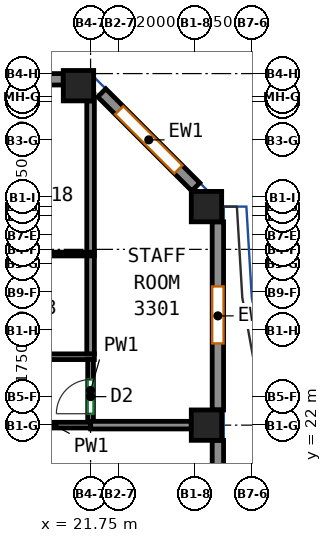
"""IFC4 building model, lengths in metres.
Left out: names, types, materials, properties, quantities, classifications, styles, units other than length and angle.
Written with IfcOpenShell. Run it as: python <this file> out.ifc"""

import sys

from ifc_helpers import new_model, si_unit, direction, frame, frame_2d, origin, origin_2d, place, context, subcontext, project, spatial, rectangle, extrude, source, transform, mapped, element, fill, save


model = new_model("IFC4")
c1 = context("Model", 3, precision=1e-05, world=origin(), true_north=direction((0.0, 1.0)))
c2 = subcontext(c1, "Body", "Model", "MODEL_VIEW")
j1 = project(units=[si_unit("LENGTHUNIT", "METRE"), si_unit("PLANEANGLEUNIT", "RADIAN")], contexts=[c1])
p1 = place(None, origin())
s1 = spatial("IfcSite", under=j1, at=p1, CompositionType="ELEMENT")
p2 = place(p1, origin())
s2 = spatial("IfcBuilding", under=s1, at=p2, CompositionType="ELEMENT")
p3 = place(p2, frame((0.0, 0.0, 147.3)))
s3 = spatial("IfcBuildingStorey", under=s2, at=p3, CompositionType="ELEMENT", Elevation=147.3)
m1 = source(origin(), c2, "Body", "SweptSolid", [
    extrude(rectangle(XDim=0.8, YDim=0.8, at=origin_2d()), origin(), (0.0, 0.0, 1.0), 3.12),
])
for number, where, z_axis, x_axis in (
    (1, (21.432, 30.932, 0.0), (0.0, 0.0, 1.0), (1.0, 0.0, 0.0)),
    (2, (24.8, 22.0, 0.0), (0.0, 0.0, 1.0), (1.0, 0.0, 0.0)),
    (3, (24.8, 27.75, 0.0), (0.0, 0.0, 1.0), (1.0, 0.0, 0.0)),
):
    element("IfcColumn", number, at=place(p3, frame(where, z_axis=z_axis, x_axis=x_axis)), inside=s3, PredefinedType="COLUMN", context=c2, shape_type="MappedRepresentation", body=[
        mapped(m1, transform((0.0, 0.0, 0.0))),
    ])
m2 = source(origin(), c2, "Body", "SweptSolid", [
    extrude(rectangle(XDim=13.2, YDim=0.3, at=frame_2d((6.6, 0.0))), origin(), (0.0, 0.0, 1.0), 3.12),
])
p4 = place(p3, frame((25.1, 8.4, 0.0), z_axis=(0.0, 0.0, 1.0), x_axis=(0.0, 1.0, 0.0)))
e4 = element("IfcWall", 4, at=p4, inside=s3, PredefinedType="SOLIDWALL", context=c2, shape_type="MappedRepresentation", body=[
    mapped(m2, transform((0.0, 0.0, 0.0))),
])
p5 = place(p4, frame((0.9, 0.0, 0.85)))
e5 = element("IfcOpeningElement", 5, at=p5, cuts=e4, PredefinedType="OPENING", context=c2, shape_type="SweptSolid", body=[
    extrude(rectangle(XDim=1.5, YDim=1.95, at=frame_2d((0.75, 0.975))), frame((0.0, 0.16, 0.0), z_axis=(0.0, -1.0, 0.0), x_axis=(1.0, 0.0, 0.0)), (0.0, 0.0, 1.0), 0.32),
])
p6 = place(p4, frame((4.2, 0.0, 0.85)))
e6 = element("IfcOpeningElement", 6, at=p6, cuts=e4, PredefinedType="OPENING", context=c2, shape_type="SweptSolid", body=[
    extrude(rectangle(XDim=1.5, YDim=1.95, at=frame_2d((0.75, 0.975))), frame((0.0, 0.16, 0.0), z_axis=(0.0, -1.0, 0.0), x_axis=(1.0, 0.0, 0.0)), (0.0, 0.0, 1.0), 0.32),
])
p7 = place(p4, frame((7.5, 0.0, 0.85)))
e7 = element("IfcOpeningElement", 7, at=p7, cuts=e4, PredefinedType="OPENING", context=c2, shape_type="SweptSolid", body=[
    extrude(rectangle(XDim=1.5, YDim=1.95, at=frame_2d((0.75, 0.975))), frame((0.0, 0.16, 0.0), z_axis=(0.0, -1.0, 0.0), x_axis=(1.0, 0.0, 0.0)), (0.0, 0.0, 1.0), 0.32),
])
p8 = place(p4, frame((10.8, 0.0, 0.85)))
e8 = element("IfcOpeningElement", 8, at=p8, cuts=e4, PredefinedType="OPENING", context=c2, shape_type="SweptSolid", body=[
    extrude(rectangle(XDim=1.5, YDim=1.95, at=frame_2d((0.75, 0.975))), frame((0.0, 0.16, 0.0), z_axis=(0.0, -1.0, 0.0), x_axis=(1.0, 0.0, 0.0)), (0.0, 0.0, 1.0), 0.32),
])
m3 = source(origin(), c2, "Body", "SweptSolid", [
    extrude(rectangle(XDim=4.95, YDim=0.3, at=frame_2d((2.475, 0.0))), origin(), (0.0, 0.0, 1.0), 3.12),
])
p9 = place(p3, frame((25.1, 22.4, 0.0), z_axis=(0.0, 0.0, 1.0), x_axis=(0.0, 1.0, 0.0)))
e9 = element("IfcWall", 9, at=p9, inside=s3, PredefinedType="SOLIDWALL", context=c2, shape_type="MappedRepresentation", body=[
    mapped(m3, transform((0.0, 0.0, 0.0))),
])
p10 = place(p9, frame((1.75, 0.0, 0.85)))
e10 = element("IfcOpeningElement", 10, at=p10, cuts=e9, PredefinedType="OPENING", context=c2, shape_type="SweptSolid", body=[
    extrude(rectangle(XDim=1.5, YDim=1.95, at=frame_2d((0.75, 0.975))), frame((0.0, 0.16, 0.0), z_axis=(0.0, -1.0, 0.0), x_axis=(1.0, 0.0, 0.0)), (0.0, 0.0, 1.0), 0.32),
])
m4 = source(origin(), c2, "Body", "SweptSolid", [
    extrude(rectangle(XDim=3.5, YDim=0.3, at=frame_2d((1.75, 0.0))), origin(), (0.0, 0.0, 1.0), 3.12),
])
p11 = place(p3, frame((24.519, 28.269, 0.0), z_axis=(0.0, 0.0, 1.0), x_axis=(-0.70707190453, 0.707141656123, 0.0)))
e11 = element("IfcWall", 11, at=p11, inside=s3, PredefinedType="SOLIDWALL", context=c2, shape_type="MappedRepresentation", body=[
    mapped(m4, transform((0.0, 0.0, 0.0))),
])
p12 = place(p11, frame((0.65, 0.0, 0.85)))
e12 = element("IfcOpeningElement", 12, at=p12, cuts=e11, PredefinedType="OPENING", context=c2, shape_type="SweptSolid", body=[
    extrude(rectangle(XDim=2.2, YDim=1.95, at=frame_2d((1.1, 0.975))), frame((0.0, 0.16, 0.0), z_axis=(0.0, -1.0, 0.0), x_axis=(1.0, 0.0, 0.0)), (0.0, 0.0, 1.0), 0.32),
])
m5 = source(origin(), c2, "Body", "SweptSolid", [
    extrude(rectangle(XDim=6.465, YDim=0.3, at=frame_2d((3.232, 0.0))), origin(), (0.0, 0.0, 1.0), 3.12),
])
p13 = place(p3, frame((21.032, 31.1, 0.0), z_axis=(0.0, 0.0, 1.0), x_axis=(-1.0, 0.0, 0.0)))
e13 = element("IfcWall", 13, at=p13, inside=s3, PredefinedType="SOLIDWALL", context=c2, shape_type="MappedRepresentation", body=[
    mapped(m5, transform((0.0, 0.0, 0.0))),
])
p14 = place(p13, frame((0.516, 0.0, 0.85)))
e14 = element("IfcOpeningElement", 14, at=p14, cuts=e13, PredefinedType="OPENING", context=c2, shape_type="SweptSolid", body=[
    extrude(rectangle(XDim=2.2, YDim=1.95, at=frame_2d((1.1, 0.975))), frame((0.0, 0.16, 0.0), z_axis=(0.0, -1.0, 0.0), x_axis=(1.0, 0.0, 0.0)), (0.0, 0.0, 1.0), 0.32),
])
p15 = place(p13, frame((3.749, 0.0, 0.85)))
e15 = element("IfcOpeningElement", 15, at=p15, cuts=e13, PredefinedType="OPENING", context=c2, shape_type="SweptSolid", body=[
    extrude(rectangle(XDim=2.2, YDim=1.95, at=frame_2d((1.1, 0.975))), frame((0.0, 0.16, 0.0), z_axis=(0.0, -1.0, 0.0), x_axis=(1.0, 0.0, 0.0)), (0.0, 0.0, 1.0), 0.32),
])
p16 = place(p3, frame((-20.059, 23.8, 0.0), z_axis=(0.0, 0.0, 1.0), x_axis=(1.0, 0.0, 0.0)))
e16 = element("IfcWall", 16, at=p16, inside=s3, PredefinedType="PARTITIONING", context=c2, shape_type="SweptSolid", body=[
    extrude(rectangle(XDim=41.909, YDim=0.15, at=frame_2d((20.955, 0.0))), origin(), (0.0, 0.0, 1.0), 3.12),
])
p17 = place(p16, frame((0.401, 0.0, 0.0)))
e17 = element("IfcOpeningElement", 17, at=p17, cuts=e16, PredefinedType="OPENING", context=c2, shape_type="SweptSolid", body=[
    extrude(rectangle(XDim=1.0, YDim=2.1, at=frame_2d((0.5, 1.05))), frame((0.0, 0.085, 0.0), z_axis=(0.0, -1.0, 0.0), x_axis=(1.0, 0.0, 0.0)), (0.0, 0.0, 1.0), 0.17),
])
p18 = place(p16, frame((6.082, 0.0, 0.0)))
e18 = element("IfcOpeningElement", 18, at=p18, cuts=e16, PredefinedType="OPENING", context=c2, shape_type="SweptSolid", body=[
    extrude(rectangle(XDim=1.0, YDim=2.1, at=frame_2d((0.5, 1.05))), frame((0.0, 0.085, 0.0), z_axis=(0.0, -1.0, 0.0), x_axis=(1.0, 0.0, 0.0)), (0.0, 0.0, 1.0), 0.17),
])
p19 = place(p16, frame((8.08, 0.0, 0.0)))
e19 = element("IfcOpeningElement", 19, at=p19, cuts=e16, PredefinedType="OPENING", context=c2, shape_type="SweptSolid", body=[
    extrude(rectangle(XDim=1.0, YDim=2.1, at=frame_2d((0.5, 1.05))), frame((0.0, 0.085, 0.0), z_axis=(0.0, -1.0, 0.0), x_axis=(1.0, 0.0, 0.0)), (0.0, 0.0, 1.0), 0.17),
])
p20 = place(p16, frame((13.769, 0.0, 0.0)))
e20 = element("IfcOpeningElement", 20, at=p20, cuts=e16, PredefinedType="OPENING", context=c2, shape_type="SweptSolid", body=[
    extrude(rectangle(XDim=1.0, YDim=2.1, at=frame_2d((0.5, 1.05))), frame((0.0, 0.085, 0.0), z_axis=(0.0, -1.0, 0.0), x_axis=(1.0, 0.0, 0.0)), (0.0, 0.0, 1.0), 0.17),
])
p21 = place(p16, frame((15.56, 0.0, 0.0)))
e21 = element("IfcOpeningElement", 21, at=p21, cuts=e16, PredefinedType="OPENING", context=c2, shape_type="SweptSolid", body=[
    extrude(rectangle(XDim=1.0, YDim=2.1, at=frame_2d((0.5, 1.05))), frame((0.0, 0.085, 0.0), z_axis=(0.0, -1.0, 0.0), x_axis=(1.0, 0.0, 0.0)), (0.0, 0.0, 1.0), 0.17),
])
p22 = place(p16, frame((21.625, 0.0, 0.0)))
e22 = element("IfcOpeningElement", 22, at=p22, cuts=e16, PredefinedType="OPENING", context=c2, shape_type="SweptSolid", body=[
    extrude(rectangle(XDim=1.0, YDim=2.1, at=frame_2d((0.5, 1.05))), frame((0.0, 0.085, 0.0), z_axis=(0.0, -1.0, 0.0), x_axis=(1.0, 0.0, 0.0)), (0.0, 0.0, 1.0), 0.17),
])
p23 = place(p16, frame((23.212, 0.0, 0.0)))
e23 = element("IfcOpeningElement", 23, at=p23, cuts=e16, PredefinedType="OPENING", context=c2, shape_type="SweptSolid", body=[
    extrude(rectangle(XDim=1.0, YDim=2.1, at=frame_2d((0.5, 1.05))), frame((0.0, 0.085, 0.0), z_axis=(0.0, -1.0, 0.0), x_axis=(1.0, 0.0, 0.0)), (0.0, 0.0, 1.0), 0.17),
])
p24 = place(p16, frame((29.038, 0.0, 0.0)))
e24 = element("IfcOpeningElement", 24, at=p24, cuts=e16, PredefinedType="OPENING", context=c2, shape_type="SweptSolid", body=[
    extrude(rectangle(XDim=1.0, YDim=2.1, at=frame_2d((0.5, 1.05))), frame((0.0, 0.085, 0.0), z_axis=(0.0, -1.0, 0.0), x_axis=(1.0, 0.0, 0.0)), (0.0, 0.0, 1.0), 0.17),
])
p25 = place(p16, frame((30.624, 0.0, 0.0)))
e25 = element("IfcOpeningElement", 25, at=p25, cuts=e16, PredefinedType="OPENING", context=c2, shape_type="SweptSolid", body=[
    extrude(rectangle(XDim=1.0, YDim=2.1, at=frame_2d((0.5, 1.05))), frame((0.0, 0.085, 0.0), z_axis=(0.0, -1.0, 0.0), x_axis=(1.0, 0.0, 0.0)), (0.0, 0.0, 1.0), 0.17),
])
p26 = place(p16, frame((36.622, 0.0, 0.0)))
e26 = element("IfcOpeningElement", 26, at=p26, cuts=e16, PredefinedType="OPENING", context=c2, shape_type="SweptSolid", body=[
    extrude(rectangle(XDim=1.0, YDim=2.1, at=frame_2d((0.5, 1.05))), frame((0.0, 0.085, 0.0), z_axis=(0.0, -1.0, 0.0), x_axis=(1.0, 0.0, 0.0)), (0.0, 0.0, 1.0), 0.17),
])
p27 = place(p16, frame((38.516, 0.0, 0.0)))
e27 = element("IfcOpeningElement", 27, at=p27, cuts=e16, PredefinedType="OPENING", context=c2, shape_type="SweptSolid", body=[
    extrude(rectangle(XDim=1.0, YDim=2.1, at=frame_2d((0.5, 1.05))), frame((0.0, 0.085, 0.0), z_axis=(0.0, -1.0, 0.0), x_axis=(1.0, 0.0, 0.0)), (0.0, 0.0, 1.0), 0.17),
])
p28 = place(p3, frame((21.75, 22.1, 0.0), z_axis=(0.0, 0.0, 1.0), x_axis=(0.0, 1.0, 0.0)))
e28 = element("IfcWall", 28, at=p28, inside=s3, PredefinedType="PARTITIONING", context=c2, shape_type="SweptSolid", body=[
    extrude(rectangle(XDim=1.625, YDim=0.15, at=frame_2d((0.812, 0.0))), origin(), (0.0, 0.0, 1.0), 3.12),
])
p29 = place(p28, frame((0.2, 0.0, 0.0)))
e29 = element("IfcOpeningElement", 29, at=p29, cuts=e28, PredefinedType="OPENING", context=c2, shape_type="SweptSolid", body=[
    extrude(rectangle(XDim=0.9, YDim=2.1, at=frame_2d((0.45, 1.05))), frame((0.0, 0.085, 0.0), z_axis=(0.0, -1.0, 0.0), x_axis=(1.0, 0.0, 0.0)), (0.0, 0.0, 1.0), 0.17),
])
p30 = place(p3, frame((19.825, 22.0, 0.0), z_axis=(0.0, 0.0, 1.0), x_axis=(1.0, 0.0, 0.0)))
e30 = element("IfcWall", 30, at=p30, inside=s3, PredefinedType="PARTITIONING", context=c2, shape_type="SweptSolid", body=[
    extrude(rectangle(XDim=1.925, YDim=0.15, at=frame_2d((0.962, 0.0))), origin(), (0.0, 0.0, 1.0), 3.12),
])
p31 = place(p3, frame((19.7, 26.502, 0.0), z_axis=(0.0, 0.0, 1.0), x_axis=(1.0, 0.0, 0.0)))
e31 = element("IfcWall", 31, at=p31, inside=s3, PredefinedType="PARTITIONING", context=c2, shape_type="SweptSolid", body=[
    extrude(rectangle(XDim=2.15, YDim=0.1, at=frame_2d((1.075, 0.0))), origin(), (0.0, 0.0, 1.0), 3.12),
])
p32 = place(p3, frame((21.75, 26.552, 0.0), z_axis=(0.0, 0.0, 1.0), x_axis=(0.0, 1.0, 0.0)))
e32 = element("IfcWall", 32, at=p32, inside=s3, PredefinedType="PARTITIONING", context=c2, shape_type="SweptSolid", body=[
    extrude(rectangle(XDim=3.98, YDim=0.2, at=frame_2d((1.99, 0.0))), origin(), (0.0, 0.0, 1.0), 3.12),
])
p33 = place(p3, frame((21.75, 23.877, 0.0), z_axis=(0.0, 0.0, 1.0), x_axis=(0.0, 1.0, 0.0)))
e33 = element("IfcWall", 33, at=p33, inside=s3, PredefinedType="PARTITIONING", context=c2, shape_type="SweptSolid", body=[
    extrude(rectangle(XDim=2.575, YDim=0.2, at=frame_2d((1.288, 0.0))), origin(), (0.0, 0.0, 1.0), 3.12),
])
p34 = place(p3, frame((21.752, 22.0, 0.0), z_axis=(0.0, 0.0, 1.0), x_axis=(1.0, 0.0, 0.0)))
e34 = element("IfcWall", 34, at=p34, inside=s3, PredefinedType="PARTITIONING", context=c2, shape_type="SweptSolid", body=[
    extrude(rectangle(XDim=2.648, YDim=0.2, at=frame_2d((1.324, 0.0))), origin(), (0.0, 0.0, 1.0), 3.12),
])
p35 = place(p10, origin())
e35 = element("IfcWindow", 35, at=p35, inside=s3, PartitioningType="SINGLE_PANEL", PredefinedType="WINDOW", context=c2, shape_type="SweptSolid", body=[
    extrude(rectangle(XDim=1.5, YDim=1.95, at=frame_2d((0.75, 0.975))), frame((0.0, 0.03, 0.0), z_axis=(0.0, -1.0, 0.0), x_axis=(1.0, 0.0, 0.0)), (0.0, 0.0, 1.0), 0.06),
])
fill(e10, e35)
p36 = place(p12, origin())
e36 = element("IfcWindow", 36, at=p36, inside=s3, PartitioningType="SINGLE_PANEL", PredefinedType="WINDOW", context=c2, shape_type="SweptSolid", body=[
    extrude(rectangle(XDim=2.2, YDim=1.95, at=frame_2d((1.1, 0.975))), frame((0.0, 0.03, 0.0), z_axis=(0.0, -1.0, 0.0), x_axis=(1.0, 0.0, 0.0)), (0.0, 0.0, 1.0), 0.06),
])
fill(e12, e36)
p37 = place(p29, origin())
e37 = element("IfcDoor", 37, at=p37, inside=s3, OperationType="SINGLE_SWING_LEFT", PredefinedType="DOOR", context=c2, shape_type="SweptSolid", body=[
    extrude(rectangle(XDim=0.9, YDim=2.1, at=frame_2d((0.45, 1.05))), frame((0.0, 0.025, 0.0), z_axis=(0.0, -1.0, 0.0), x_axis=(1.0, 0.0, 0.0)), (0.0, 0.0, 1.0), 0.05),
])
fill(e29, e37)
save(model, sys.argv[1])
